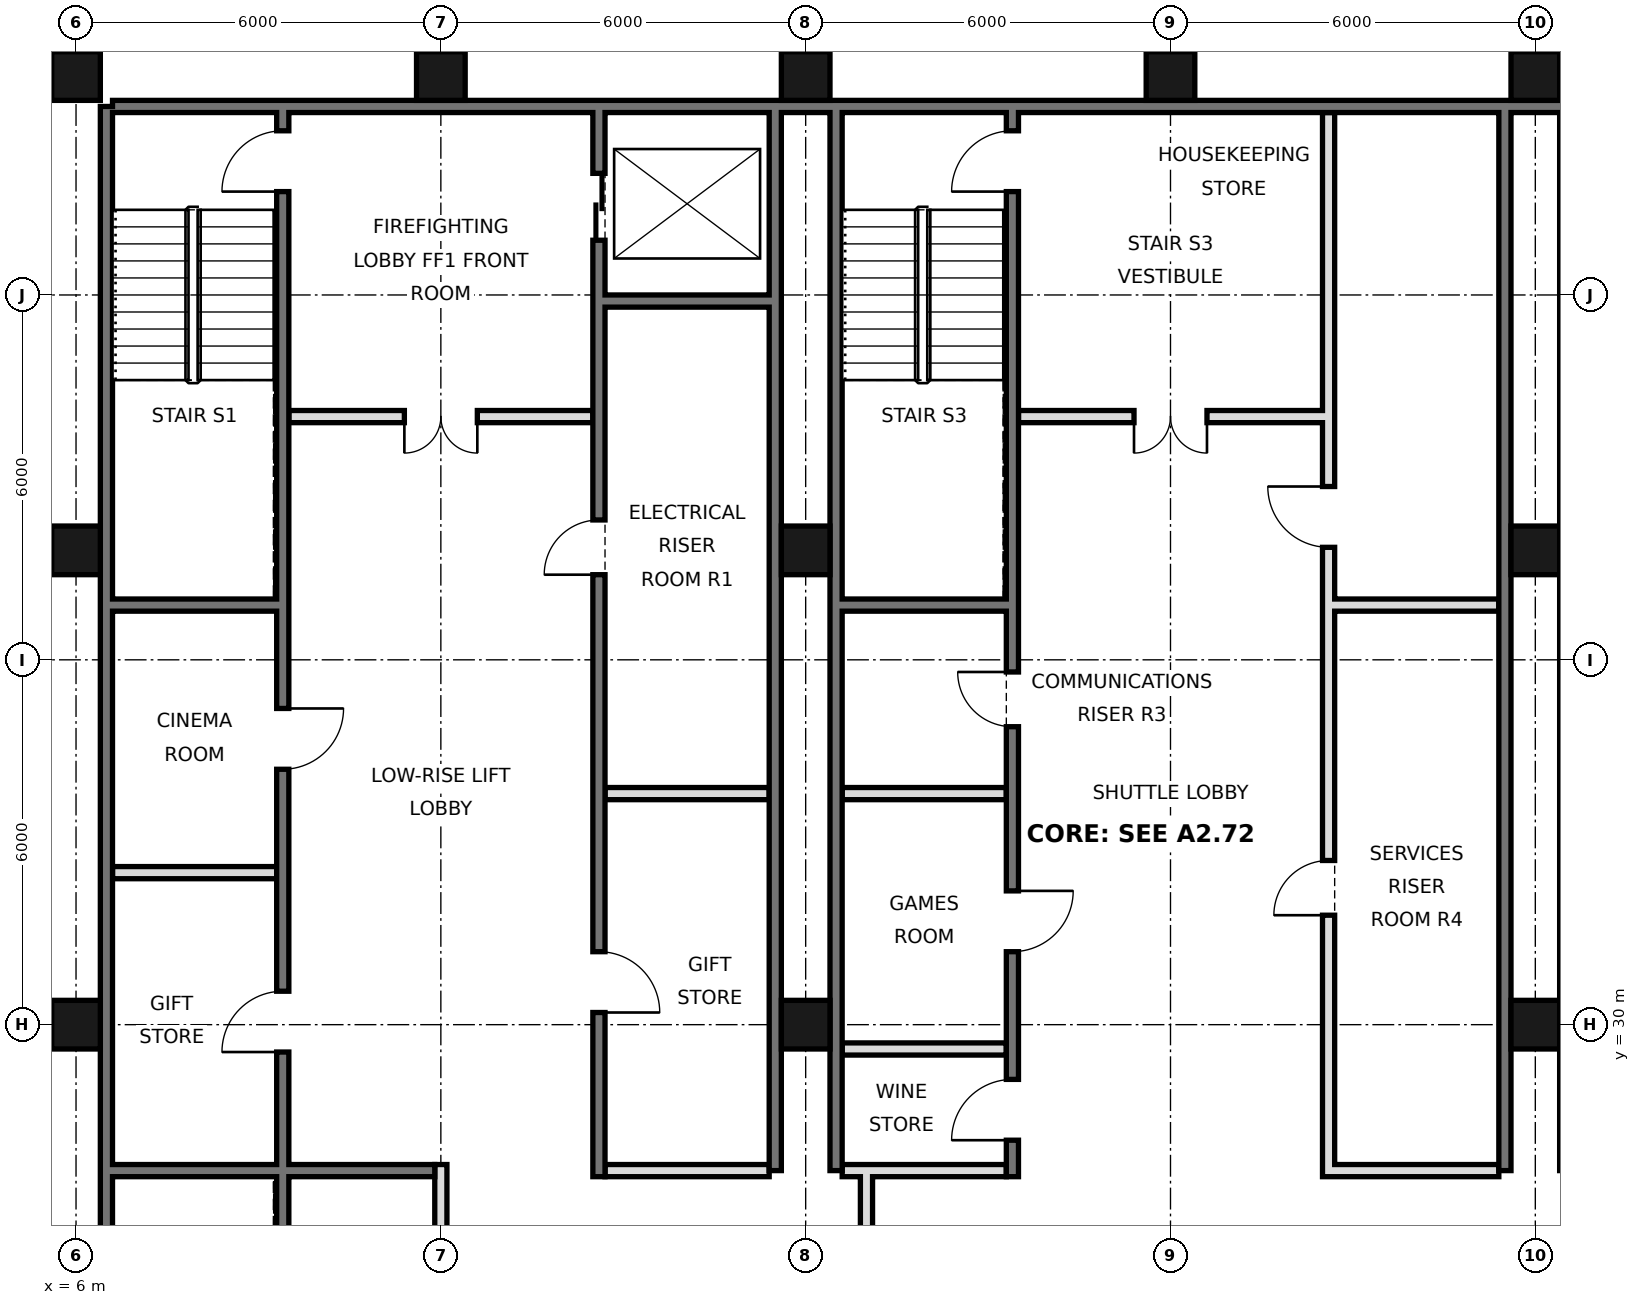
"""IFC4 building model, lengths in metres.
Left out: names, types, materials, properties, quantities, classifications, styles, units other than length and angle.
Written with IfcOpenShell. Run it as: python <this file> out.ifc"""

import sys

from ifc_helpers import new_model, si_unit, direction, frame, frame_2d, origin, origin_2d, place, context, subcontext, project, spatial, rectangle, hollow_rectangle, extrude, element, fill, save


model = new_model("IFC4")
c1 = context("Model", 3, precision=1e-05, world=origin(), true_north=direction((0.0, 1.0)))
c2 = subcontext(c1, "Body", "Model", "MODEL_VIEW")
j1 = project(units=[si_unit("LENGTHUNIT", "METRE"), si_unit("PLANEANGLEUNIT", "RADIAN")], contexts=[c1])
p1 = place(None, origin())
s1 = spatial("IfcSite", under=j1, at=p1, CompositionType="ELEMENT")
p2 = place(p1, origin())
s2 = spatial("IfcBuilding", under=s1, at=p2, CompositionType="ELEMENT")
p3 = place(p2, frame((0.0, 0.0, 290.8)))
s3 = spatial("IfcBuildingStorey", under=s2, at=p3, CompositionType="ELEMENT", Elevation=290.8)
for number, where, z_axis, x_axis in (
    (1, (6.0, 30.0, 0.0), (0.0, 0.0, 1.0), (1.0, 0.0, 0.0)),
    (2, (6.0, 37.8, 0.0), (0.0, 0.0, 1.0), (1.0, 0.0, 0.0)),
    (3, (6.0, 45.6, 0.0), (0.0, 0.0, 1.0), (1.0, 0.0, 0.0)),
    (4, (12.0, 45.6, 0.0), (0.0, 0.0, 1.0), (1.0, 0.0, 0.0)),
    (5, (18.0, 30.0, 0.0), (0.0, 0.0, 1.0), (1.0, 0.0, 0.0)),
    (6, (18.0, 37.8, 0.0), (0.0, 0.0, 1.0), (1.0, 0.0, 0.0)),
    (7, (18.0, 45.6, 0.0), (0.0, 0.0, 1.0), (1.0, 0.0, 0.0)),
    (8, (24.0, 45.6, 0.0), (0.0, 0.0, 1.0), (1.0, 0.0, 0.0)),
    (9, (30.0, 30.0, 0.0), (0.0, 0.0, 1.0), (1.0, 0.0, 0.0)),
    (10, (30.0, 37.8, 0.0), (0.0, 0.0, 1.0), (1.0, 0.0, 0.0)),
    (11, (30.0, 45.6, 0.0), (0.0, 0.0, 1.0), (1.0, 0.0, 0.0)),
):
    element("IfcColumn", number, at=place(p3, frame(where, z_axis=z_axis, x_axis=x_axis)), inside=s3, PredefinedType="COLUMN", context=c2, shape_type="SweptSolid", body=[
        extrude(hollow_rectangle(XDim=0.8, YDim=0.8, WallThickness=0.032, at=origin_2d()), origin(), (0.0, 0.0, 1.0), 3.6),
    ])
p4 = place(p3, frame((6.5, 21.6, 0.0), z_axis=(0.0, 0.0, 1.0), x_axis=(0.0, 1.0, 0.0)))
e12 = element("IfcWall", 12, at=p4, inside=s3, PredefinedType="SOLIDWALL", context=c2, shape_type="SweptSolid", body=[
    extrude(rectangle(XDim=23.5, YDim=0.2, at=frame_2d((11.75, 0.0))), origin(), (0.0, 0.0, 1.0), 3.42),
])
p5 = place(p3, frame((6.6, 45.1, 0.0), z_axis=(0.0, 0.0, 1.0), x_axis=(1.0, 0.0, 0.0)))
e13 = element("IfcWall", 13, at=p5, inside=s3, PredefinedType="SOLIDWALL", context=c2, shape_type="SweptSolid", body=[
    extrude(rectangle(XDim=34.8, YDim=0.2, at=frame_2d((17.4, 0.0))), origin(), (0.0, 0.0, 1.0), 3.42),
])
for number, where, z_axis, x_axis in (
    (14, (17.5, 27.6, 0.0), (0.0, 0.0, 1.0), (0.0, 1.0, 0.0)),
    (15, (18.5, 27.6, 0.0), (0.0, 0.0, 1.0), (0.0, 1.0, 0.0)),
    (16, (29.5, 27.6, 0.0), (0.0, 0.0, 1.0), (0.0, 1.0, 0.0)),
):
    element("IfcWall", number, at=place(p3, frame(where, z_axis=z_axis, x_axis=x_axis)), inside=s3, PredefinedType="SOLIDWALL", context=c2, shape_type="SweptSolid", body=[
        extrude(rectangle(XDim=17.5, YDim=0.2, at=frame_2d((8.75, 0.0))), origin(), (0.0, 0.0, 1.0), 3.42),
    ])
p6 = place(p3, frame((19.0, 21.6, 0.0), z_axis=(0.0, 0.0, 1.0), x_axis=(0.0, 1.0, 0.0)))
e17 = element("IfcWall", 17, at=p6, inside=s3, PredefinedType="PARTITIONING", context=c2, shape_type="SweptSolid", body=[
    extrude(rectangle(XDim=6.0, YDim=0.2, at=frame_2d((3.0, 0.0))), origin(), (0.0, 0.0, 1.0), 3.42),
])
p7 = place(p6, frame((2.1, 0.0, 0.0)))
e18 = element("IfcOpeningElement", 18, at=p7, cuts=e17, PredefinedType="OPENING", context=c2, shape_type="SweptSolid", body=[
    extrude(rectangle(XDim=1.8, YDim=2.1, at=frame_2d((0.9, 1.05))), frame((0.0, 0.11, 0.0), z_axis=(0.0, -1.0, 0.0), x_axis=(1.0, 0.0, 0.0)), (0.0, 0.0, 1.0), 0.22),
])
p8 = place(p3, frame((12.0, 21.6, 0.0), z_axis=(0.0, 0.0, 1.0), x_axis=(0.0, 1.0, 0.0)))
e19 = element("IfcWall", 19, at=p8, inside=s3, PredefinedType="PARTITIONING", context=c2, shape_type="SweptSolid", body=[
    extrude(rectangle(XDim=6.1, YDim=0.2, at=frame_2d((3.05, 0.0))), origin(), (0.0, 0.0, 1.0), 3.42),
])
p9 = place(p3, frame((14.6, 27.5, 0.0), z_axis=(0.0, 0.0, 1.0), x_axis=(0.0, 1.0, 0.0)))
e20 = element("IfcWall", 20, at=p9, inside=s3, PredefinedType="SOLIDWALL", context=c2, shape_type="SweptSolid", body=[
    extrude(rectangle(XDim=17.5, YDim=0.2, at=frame_2d((8.75, 0.0))), origin(), (0.0, 0.0, 1.0), 3.42),
])
p10 = place(p9, frame((15.4, 0.0, 0.0)))
e21 = element("IfcOpeningElement", 21, at=p10, cuts=e20, PredefinedType="OPENING", context=c2, shape_type="SweptSolid", body=[
    extrude(rectangle(XDim=1.1, YDim=2.1, at=frame_2d((0.55, 1.05))), frame((0.0, 0.11, 0.0), z_axis=(0.0, -1.0, 0.0), x_axis=(1.0, 0.0, 0.0)), (0.0, 0.0, 1.0), 0.22),
])
p11 = place(p9, frame((2.7, 0.0, 0.0)))
e22 = element("IfcOpeningElement", 22, at=p11, cuts=e20, PredefinedType="OPENING", context=c2, shape_type="SweptSolid", body=[
    extrude(rectangle(XDim=1.0, YDim=2.1, at=frame_2d((0.5, 1.05))), frame((0.0, 0.11, 0.0), z_axis=(0.0, -1.0, 0.0), x_axis=(1.0, 0.0, 0.0)), (0.0, 0.0, 1.0), 0.22),
])
p12 = place(p9, frame((9.9, 0.0, 0.0)))
e23 = element("IfcOpeningElement", 23, at=p12, cuts=e20, PredefinedType="OPENING", context=c2, shape_type="SweptSolid", body=[
    extrude(rectangle(XDim=0.9, YDim=2.1, at=frame_2d((0.45, 1.05))), frame((0.0, 0.11, 0.0), z_axis=(0.0, -1.0, 0.0), x_axis=(1.0, 0.0, 0.0)), (0.0, 0.0, 1.0), 0.22),
])
p13 = place(p3, frame((21.4, 27.5, 0.0), z_axis=(0.0, 0.0, 1.0), x_axis=(0.0, 1.0, 0.0)))
e24 = element("IfcWall", 24, at=p13, inside=s3, PredefinedType="SOLIDWALL", context=c2, shape_type="SweptSolid", body=[
    extrude(rectangle(XDim=17.5, YDim=0.2, at=frame_2d((8.75, 0.0))), origin(), (0.0, 0.0, 1.0), 3.42),
])
p14 = place(p13, frame((0.6, 0.0, 0.0)))
e25 = element("IfcOpeningElement", 25, at=p14, cuts=e24, PredefinedType="OPENING", context=c2, shape_type="SweptSolid", body=[
    extrude(rectangle(XDim=1.0, YDim=2.1, at=frame_2d((0.5, 1.05))), frame((0.0, 0.11, 0.0), z_axis=(0.0, -1.0, 0.0), x_axis=(1.0, 0.0, 0.0)), (0.0, 0.0, 1.0), 0.22),
])
p15 = place(p13, frame((3.7, 0.0, 0.0)))
e26 = element("IfcOpeningElement", 26, at=p15, cuts=e24, PredefinedType="OPENING", context=c2, shape_type="SweptSolid", body=[
    extrude(rectangle(XDim=1.0, YDim=2.1, at=frame_2d((0.5, 1.05))), frame((0.0, 0.11, 0.0), z_axis=(0.0, -1.0, 0.0), x_axis=(1.0, 0.0, 0.0)), (0.0, 0.0, 1.0), 0.22),
])
p16 = place(p13, frame((16.2, 0.0, 0.0)))
e27 = element("IfcOpeningElement", 27, at=p16, cuts=e24, PredefinedType="OPENING", context=c2, shape_type="SweptSolid", body=[
    extrude(rectangle(XDim=1.0, YDim=2.1, at=frame_2d((0.5, 1.05))), frame((0.0, 0.11, 0.0), z_axis=(0.0, -1.0, 0.0), x_axis=(1.0, 0.0, 0.0)), (0.0, 0.0, 1.0), 0.22),
])
p17 = place(p13, frame((7.4, 0.0, 0.0)))
e28 = element("IfcOpeningElement", 28, at=p17, cuts=e24, PredefinedType="OPENING", context=c2, shape_type="SweptSolid", body=[
    extrude(rectangle(XDim=0.9, YDim=2.1, at=frame_2d((0.45, 1.05))), frame((0.0, 0.11, 0.0), z_axis=(0.0, -1.0, 0.0), x_axis=(1.0, 0.0, 0.0)), (0.0, 0.0, 1.0), 0.22),
])
p18 = place(p3, frame((26.6, 27.5, 0.0), z_axis=(0.0, 0.0, 1.0), x_axis=(0.0, 1.0, 0.0)))
e29 = element("IfcWall", 29, at=p18, inside=s3, PredefinedType="SOLIDWALL", context=c2, shape_type="SweptSolid", body=[
    extrude(rectangle(XDim=17.5, YDim=0.2, at=frame_2d((8.75, 0.0))), origin(), (0.0, 0.0, 1.0), 3.42),
])
p19 = place(p18, frame((4.3, 0.0, 0.0)))
e30 = element("IfcOpeningElement", 30, at=p19, cuts=e29, PredefinedType="OPENING", context=c2, shape_type="SweptSolid", body=[
    extrude(rectangle(XDim=0.9, YDim=2.1, at=frame_2d((0.45, 1.05))), frame((0.0, 0.11, 0.0), z_axis=(0.0, -1.0, 0.0), x_axis=(1.0, 0.0, 0.0)), (0.0, 0.0, 1.0), 0.22),
])
p20 = place(p18, frame((10.35, 0.0, 0.0)))
e31 = element("IfcOpeningElement", 31, at=p20, cuts=e29, PredefinedType="OPENING", context=c2, shape_type="SweptSolid", body=[
    extrude(rectangle(XDim=1.0, YDim=2.1, at=frame_2d((0.5, 1.05))), frame((0.0, 0.11, 0.0), z_axis=(0.0, -1.0, 0.0), x_axis=(1.0, 0.0, 0.0)), (0.0, 0.0, 1.0), 0.22),
])
p21 = place(p3, frame((9.4, 21.6, 0.0), z_axis=(0.0, 0.0, 1.0), x_axis=(0.0, 1.0, 0.0)))
e32 = element("IfcWall", 32, at=p21, inside=s3, PredefinedType="SOLIDWALL", context=c2, shape_type="SweptSolid", body=[
    extrude(rectangle(XDim=23.4, YDim=0.2, at=frame_2d((11.7, 0.0))), origin(), (0.0, 0.0, 1.0), 3.42),
])
p22 = place(p21, frame((7.95, 0.0, 0.0)))
e33 = element("IfcOpeningElement", 33, at=p22, cuts=e32, PredefinedType="OPENING", context=c2, shape_type="SweptSolid", body=[
    extrude(rectangle(XDim=1.0, YDim=2.1, at=frame_2d((0.5, 1.05))), frame((0.0, 0.11, 0.0), z_axis=(0.0, -1.0, 0.0), x_axis=(1.0, 0.0, 0.0)), (0.0, 0.0, 1.0), 0.22),
])
p23 = place(p21, frame((12.6, 0.0, 0.0)))
e34 = element("IfcOpeningElement", 34, at=p23, cuts=e32, PredefinedType="OPENING", context=c2, shape_type="SweptSolid", body=[
    extrude(rectangle(XDim=1.0, YDim=2.1, at=frame_2d((0.5, 1.05))), frame((0.0, 0.11, 0.0), z_axis=(0.0, -1.0, 0.0), x_axis=(1.0, 0.0, 0.0)), (0.0, 0.0, 1.0), 0.22),
])
p24 = place(p21, frame((22.1, 0.0, 0.0)))
e35 = element("IfcOpeningElement", 35, at=p24, cuts=e32, PredefinedType="OPENING", context=c2, shape_type="SweptSolid", body=[
    extrude(rectangle(XDim=1.0, YDim=2.1, at=frame_2d((0.5, 1.05))), frame((0.0, 0.11, 0.0), z_axis=(0.0, -1.0, 0.0), x_axis=(1.0, 0.0, 0.0)), (0.0, 0.0, 1.0), 0.22),
])
p25 = place(p21, frame((0.175, 0.0, 0.0)))
e36 = element("IfcOpeningElement", 36, at=p25, cuts=e32, PredefinedType="OPENING", context=c2, shape_type="SweptSolid", body=[
    extrude(rectangle(XDim=0.9, YDim=2.1, at=frame_2d((0.45, 1.05))), frame((0.0, 0.11, 0.0), z_axis=(0.0, -1.0, 0.0), x_axis=(1.0, 0.0, 0.0)), (0.0, 0.0, 1.0), 0.22),
])
for number, where, z_axis, x_axis in (
    (37, (14.7, 27.6, 0.0), (0.0, 0.0, 1.0), (1.0, 0.0, 0.0)),
    (38, (18.6, 27.6, 0.0), (0.0, 0.0, 1.0), (1.0, 0.0, 0.0)),
):
    element("IfcWall", number, at=place(p3, frame(where, z_axis=z_axis, x_axis=x_axis)), inside=s3, PredefinedType="PARTITIONING", context=c2, shape_type="SweptSolid", body=[
        extrude(rectangle(XDim=2.7, YDim=0.2, at=frame_2d((1.35, 0.0))), origin(), (0.0, 0.0, 1.0), 3.42),
    ])
p26 = place(p3, frame((26.7, 27.6, 0.0), z_axis=(0.0, 0.0, 1.0), x_axis=(1.0, 0.0, 0.0)))
e39 = element("IfcWall", 39, at=p26, inside=s3, PredefinedType="SOLIDWALL", context=c2, shape_type="SweptSolid", body=[
    extrude(rectangle(XDim=2.7, YDim=0.2, at=frame_2d((1.35, 0.0))), origin(), (0.0, 0.0, 1.0), 3.42),
])
p27 = place(p3, frame((6.6, 27.6, 0.0), z_axis=(0.0, 0.0, 1.0), x_axis=(1.0, 0.0, 0.0)))
e40 = element("IfcWall", 40, at=p27, inside=s3, PredefinedType="SOLIDWALL", context=c2, shape_type="SweptSolid", body=[
    extrude(rectangle(XDim=5.3, YDim=0.2, at=frame_2d((2.65, 0.0))), origin(), (0.0, 0.0, 1.0), 3.42),
])
for number, where, z_axis, x_axis in (
    (41, (18.6, 29.6, 0.0), (0.0, 0.0, 1.0), (1.0, 0.0, 0.0)),
    (42, (6.6, 32.5, 0.0), (0.0, 0.0, 1.0), (1.0, 0.0, 0.0)),
):
    element("IfcWall", number, at=place(p3, frame(where, z_axis=z_axis, x_axis=x_axis)), inside=s3, PredefinedType="PARTITIONING", context=c2, shape_type="SweptSolid", body=[
        extrude(rectangle(XDim=2.7, YDim=0.2, at=frame_2d((1.35, 0.0))), origin(), (0.0, 0.0, 1.0), 3.42),
    ])
for number, where, z_axis, x_axis in (
    (43, (14.7, 33.8, 0.0), (0.0, 0.0, 1.0), (1.0, 0.0, 0.0)),
    (44, (18.6, 33.8, 0.0), (0.0, 0.0, 1.0), (1.0, 0.0, 0.0)),
    (45, (18.6, 36.9, 0.0), (0.0, 0.0, 1.0), (1.0, 0.0, 0.0)),
    (46, (26.7, 36.9, 0.0), (0.0, 0.0, 1.0), (1.0, 0.0, 0.0)),
    (47, (6.6, 36.9, 0.0), (0.0, 0.0, 1.0), (1.0, 0.0, 0.0)),
):
    element("IfcWall", number, at=place(p3, frame(where, z_axis=z_axis, x_axis=x_axis)), inside=s3, PredefinedType="SOLIDWALL", context=c2, shape_type="SweptSolid", body=[
        extrude(rectangle(XDim=2.7, YDim=0.2, at=frame_2d((1.35, 0.0))), origin(), (0.0, 0.0, 1.0), 3.42),
    ])
p28 = place(p3, frame((21.5, 40.0, 0.0), z_axis=(0.0, 0.0, 1.0), x_axis=(1.0, 0.0, 0.0)))
e48 = element("IfcWall", 48, at=p28, inside=s3, PredefinedType="PARTITIONING", context=c2, shape_type="SweptSolid", body=[
    extrude(rectangle(XDim=5.0, YDim=0.2, at=frame_2d((2.5, 0.0))), origin(), (0.0, 0.0, 1.0), 3.42),
])
p29 = place(p28, frame((1.9, 0.0, 0.0)))
e49 = element("IfcOpeningElement", 49, at=p29, cuts=e48, PredefinedType="OPENING", context=c2, shape_type="SweptSolid", body=[
    extrude(rectangle(XDim=1.2, YDim=2.1, at=frame_2d((0.6, 1.05))), frame((0.0, 0.11, 0.0), z_axis=(0.0, -1.0, 0.0), x_axis=(1.0, 0.0, 0.0)), (0.0, 0.0, 1.0), 0.22),
])
p30 = place(p3, frame((9.5, 40.0, 0.0), z_axis=(0.0, 0.0, 1.0), x_axis=(1.0, 0.0, 0.0)))
e50 = element("IfcWall", 50, at=p30, inside=s3, PredefinedType="PARTITIONING", context=c2, shape_type="SweptSolid", body=[
    extrude(rectangle(XDim=5.0, YDim=0.2, at=frame_2d((2.5, 0.0))), origin(), (0.0, 0.0, 1.0), 3.42),
])
p31 = place(p30, frame((1.9, 0.0, 0.0)))
e51 = element("IfcOpeningElement", 51, at=p31, cuts=e50, PredefinedType="OPENING", context=c2, shape_type="SweptSolid", body=[
    extrude(rectangle(XDim=1.2, YDim=2.1, at=frame_2d((0.6, 1.05))), frame((0.0, 0.11, 0.0), z_axis=(0.0, -1.0, 0.0), x_axis=(1.0, 0.0, 0.0)), (0.0, 0.0, 1.0), 0.22),
])
p32 = place(p3, frame((14.7, 41.9, 0.0), z_axis=(0.0, 0.0, 1.0), x_axis=(1.0, 0.0, 0.0)))
e52 = element("IfcWall", 52, at=p32, inside=s3, PredefinedType="SOLIDWALL", context=c2, shape_type="SweptSolid", body=[
    extrude(rectangle(XDim=2.7, YDim=0.2, at=frame_2d((1.35, 0.0))), origin(), (0.0, 0.0, 1.0), 3.42),
])
p33 = place(p31, frame((1.2, 0.0, 0.0), z_axis=(0.0, 0.0, 1.0), x_axis=(-1.0, 0.0, 0.0)))
e53 = element("IfcDoor", 53, at=p33, inside=s3, OperationType="DOUBLE_DOOR_SINGLE_SWING", PredefinedType="DOOR", context=c2, shape_type="SweptSolid", body=[
    extrude(rectangle(XDim=1.2, YDim=2.1, at=frame_2d((0.6, 1.05))), frame((0.0, 0.025, 0.0), z_axis=(0.0, -1.0, 0.0), x_axis=(1.0, 0.0, 0.0)), (0.0, 0.0, 1.0), 0.05),
])
fill(e51, e53)
p34 = place(p29, frame((1.2, 0.0, 0.0), z_axis=(0.0, 0.0, 1.0), x_axis=(-1.0, 0.0, 0.0)))
e54 = element("IfcDoor", 54, at=p34, inside=s3, OperationType="DOUBLE_DOOR_SINGLE_SWING", PredefinedType="DOOR", context=c2, shape_type="SweptSolid", body=[
    extrude(rectangle(XDim=1.2, YDim=2.1, at=frame_2d((0.6, 1.05))), frame((0.0, 0.025, 0.0), z_axis=(0.0, -1.0, 0.0), x_axis=(1.0, 0.0, 0.0)), (0.0, 0.0, 1.0), 0.05),
])
fill(e49, e54)
p35 = place(p10, origin())
e55 = element("IfcDoor", 55, at=p35, inside=s3, OperationType="DOUBLE_DOOR_SLIDING", PredefinedType="DOOR", context=c2, shape_type="SweptSolid", body=[
    extrude(rectangle(XDim=1.1, YDim=2.1, at=frame_2d((0.55, 1.05))), frame((0.0, 0.025, 0.0), z_axis=(0.0, -1.0, 0.0), x_axis=(1.0, 0.0, 0.0)), (0.0, 0.0, 1.0), 0.05),
])
fill(e21, e55)
p36 = place(p14, origin())
e56 = element("IfcDoor", 56, at=p36, inside=s3, OperationType="SINGLE_SWING_LEFT", PredefinedType="DOOR", context=c2, shape_type="SweptSolid", body=[
    extrude(rectangle(XDim=1.0, YDim=2.1, at=frame_2d((0.5, 1.05))), frame((0.0, 0.025, 0.0), z_axis=(0.0, -1.0, 0.0), x_axis=(1.0, 0.0, 0.0)), (0.0, 0.0, 1.0), 0.05),
])
fill(e25, e56)
p37 = place(p15, origin())
e57 = element("IfcDoor", 57, at=p37, inside=s3, OperationType="SINGLE_SWING_RIGHT", PredefinedType="DOOR", context=c2, shape_type="SweptSolid", body=[
    extrude(rectangle(XDim=1.0, YDim=2.1, at=frame_2d((0.5, 1.05))), frame((0.0, 0.025, 0.0), z_axis=(0.0, -1.0, 0.0), x_axis=(1.0, 0.0, 0.0)), (0.0, 0.0, 1.0), 0.05),
])
fill(e26, e57)
p38 = place(p11, frame((1.0, 0.0, 0.0), z_axis=(0.0, 0.0, 1.0), x_axis=(-1.0, 0.0, 0.0)))
e58 = element("IfcDoor", 58, at=p38, inside=s3, OperationType="SINGLE_SWING_RIGHT", PredefinedType="DOOR", context=c2, shape_type="SweptSolid", body=[
    extrude(rectangle(XDim=1.0, YDim=2.1, at=frame_2d((0.5, 1.05))), frame((0.0, 0.025, 0.0), z_axis=(0.0, -1.0, 0.0), x_axis=(1.0, 0.0, 0.0)), (0.0, 0.0, 1.0), 0.05),
])
fill(e22, e58)
p39 = place(p22, origin())
e59 = element("IfcDoor", 59, at=p39, inside=s3, OperationType="SINGLE_SWING_LEFT", PredefinedType="DOOR", context=c2, shape_type="SweptSolid", body=[
    extrude(rectangle(XDim=1.0, YDim=2.1, at=frame_2d((0.5, 1.05))), frame((0.0, 0.025, 0.0), z_axis=(0.0, -1.0, 0.0), x_axis=(1.0, 0.0, 0.0)), (0.0, 0.0, 1.0), 0.05),
])
fill(e33, e59)
p40 = place(p23, origin())
e60 = element("IfcDoor", 60, at=p40, inside=s3, OperationType="SINGLE_SWING_RIGHT", PredefinedType="DOOR", context=c2, shape_type="SweptSolid", body=[
    extrude(rectangle(XDim=1.0, YDim=2.1, at=frame_2d((0.5, 1.05))), frame((0.0, 0.025, 0.0), z_axis=(0.0, -1.0, 0.0), x_axis=(1.0, 0.0, 0.0)), (0.0, 0.0, 1.0), 0.05),
])
fill(e34, e60)
p41 = place(p24, origin())
e61 = element("IfcDoor", 61, at=p41, inside=s3, OperationType="SINGLE_SWING_LEFT", PredefinedType="DOOR", context=c2, shape_type="SweptSolid", body=[
    extrude(rectangle(XDim=1.0, YDim=2.1, at=frame_2d((0.5, 1.05))), frame((0.0, 0.025, 0.0), z_axis=(0.0, -1.0, 0.0), x_axis=(1.0, 0.0, 0.0)), (0.0, 0.0, 1.0), 0.05),
])
fill(e35, e61)
p42 = place(p16, origin())
e62 = element("IfcDoor", 62, at=p42, inside=s3, OperationType="SINGLE_SWING_LEFT", PredefinedType="DOOR", context=c2, shape_type="SweptSolid", body=[
    extrude(rectangle(XDim=1.0, YDim=2.1, at=frame_2d((0.5, 1.05))), frame((0.0, 0.025, 0.0), z_axis=(0.0, -1.0, 0.0), x_axis=(1.0, 0.0, 0.0)), (0.0, 0.0, 1.0), 0.05),
])
fill(e27, e62)
p43 = place(p12, origin())
e63 = element("IfcDoor", 63, at=p43, inside=s3, OperationType="SINGLE_SWING_LEFT", PredefinedType="DOOR", context=c2, shape_type="SweptSolid", body=[
    extrude(rectangle(XDim=0.9, YDim=2.1, at=frame_2d((0.45, 1.05))), frame((0.0, 0.025, 0.0), z_axis=(0.0, -1.0, 0.0), x_axis=(1.0, 0.0, 0.0)), (0.0, 0.0, 1.0), 0.05),
])
fill(e23, e63)
p44 = place(p17, frame((0.9, 0.0, 0.0), z_axis=(0.0, 0.0, 1.0), x_axis=(-1.0, 0.0, 0.0)))
e64 = element("IfcDoor", 64, at=p44, inside=s3, OperationType="SINGLE_SWING_LEFT", PredefinedType="DOOR", context=c2, shape_type="SweptSolid", body=[
    extrude(rectangle(XDim=0.9, YDim=2.1, at=frame_2d((0.45, 1.05))), frame((0.0, 0.025, 0.0), z_axis=(0.0, -1.0, 0.0), x_axis=(1.0, 0.0, 0.0)), (0.0, 0.0, 1.0), 0.05),
])
fill(e28, e64)
p45 = place(p19, origin())
e65 = element("IfcDoor", 65, at=p45, inside=s3, OperationType="SINGLE_SWING_LEFT", PredefinedType="DOOR", context=c2, shape_type="SweptSolid", body=[
    extrude(rectangle(XDim=0.9, YDim=2.1, at=frame_2d((0.45, 1.05))), frame((0.0, 0.025, 0.0), z_axis=(0.0, -1.0, 0.0), x_axis=(1.0, 0.0, 0.0)), (0.0, 0.0, 1.0), 0.05),
])
fill(e30, e65)
p46 = place(p20, frame((1.0, 0.0, 0.0), z_axis=(0.0, 0.0, 1.0), x_axis=(-1.0, 0.0, 0.0)))
e66 = element("IfcDoor", 66, at=p46, inside=s3, OperationType="SINGLE_SWING_LEFT", PredefinedType="DOOR", context=c2, shape_type="SweptSolid", body=[
    extrude(rectangle(XDim=1.0, YDim=2.1, at=frame_2d((0.5, 1.05))), frame((0.0, 0.025, 0.0), z_axis=(0.0, -1.0, 0.0), x_axis=(1.0, 0.0, 0.0)), (0.0, 0.0, 1.0), 0.05),
])
fill(e31, e66)
save(model, sys.argv[1])
